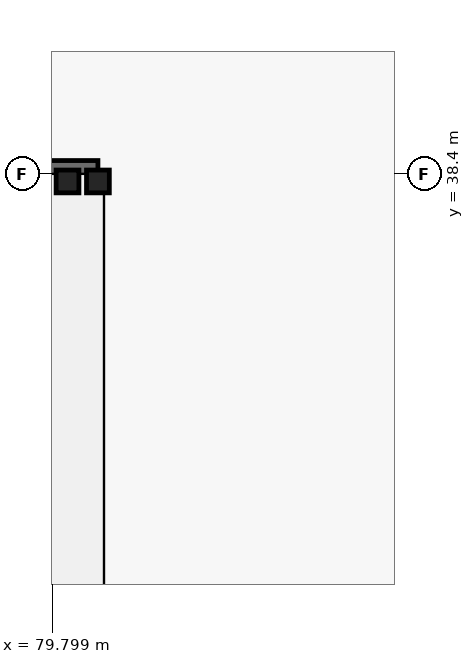
"""IFC4 building model, lengths in metres.
Left out: names, types, materials, properties, quantities, classifications, styles, units other than length and angle.
Written with IfcOpenShell. Run it as: python <this file> out.ifc"""

import sys

from ifc_helpers import new_model, si_unit, direction, frame, frame_2d, origin, origin_2d, place, context, subcontext, project, spatial, rectangle, i_section, extrude, element, save


model = new_model("IFC4")
c1 = context("Model", 3, precision=1e-05, world=origin(), true_north=direction((0.0, 1.0)))
c2 = subcontext(c1, "Body", "Model", "MODEL_VIEW")
j1 = project(units=[si_unit("LENGTHUNIT", "METRE"), si_unit("PLANEANGLEUNIT", "RADIAN")], contexts=[c1])
p1 = place(None, origin())
s1 = spatial("IfcSite", under=j1, at=p1, CompositionType="ELEMENT")
p2 = place(p1, origin())
s2 = spatial("IfcBuilding", under=s1, at=p2, CompositionType="ELEMENT")
p3 = place(p2, frame((0.0, 0.0, -4.55)))
s3 = spatial("IfcBuildingStorey", under=s2, at=p3, CompositionType="ELEMENT", Elevation=-4.55)
for number, where, z_axis, x_axis in (
    (1, (80.4, 38.3, 0.0), (0.0, 0.0, 1.0), (1.0, 0.0, 0.0)),
    (2, (80.0, 38.3, 0.0), (0.0, 0.0, 1.0), (1.0, 0.0, 0.0)),
):
    element("IfcColumn", number, at=place(p3, frame(where, z_axis=z_axis, x_axis=x_axis)), inside=s3, PredefinedType="COLUMN", context=c2, shape_type="SweptSolid", body=[
        extrude(i_section(OverallWidth=0.3, OverallDepth=0.3, WebThickness=0.011, FlangeThickness=0.019, FilletRadius=0.027, at=origin_2d()), origin(), (0.0, 0.0, 1.0), 4.55),
    ])
p4 = place(p3, frame((44.0, 38.4, -5.25), z_axis=(0.0, 0.0, 1.0), x_axis=(1.0, 0.0, 0.0)))
e3 = element("IfcWall", 3, at=p4, inside=s3, PredefinedType="SHEAR", context=c2, shape_type="SweptSolid", body=[
    extrude(rectangle(XDim=36.4, YDim=0.35, at=frame_2d((18.2, 0.0))), origin(), (0.0, 0.0, 1.0), 9.8),
])
save(model, sys.argv[1])
